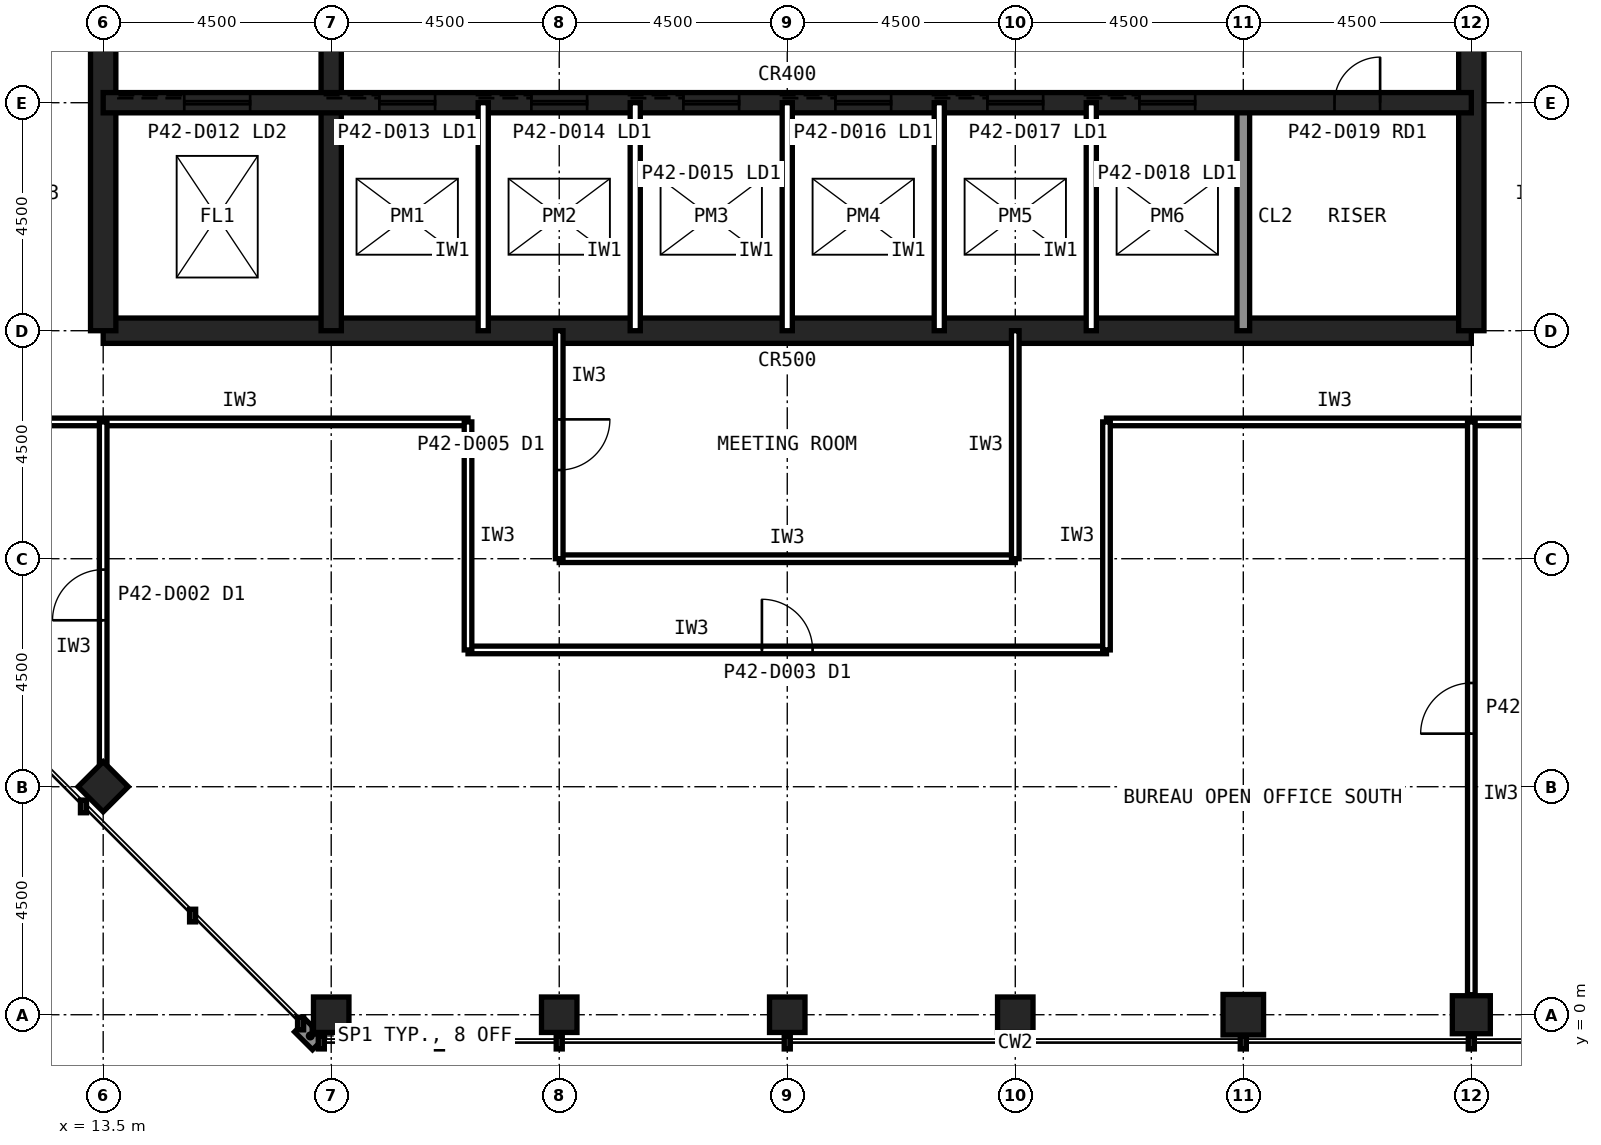
"""IFC4 building model, lengths in metres.
Left out: names, types, materials, properties, quantities, classifications, styles, units other than length and angle.
Written with IfcOpenShell. Run it as: python <this file> out.ifc"""

import sys

from ifc_helpers import new_model, si_unit, direction, frame, frame_2d, origin, origin_2d, place, context, subcontext, project, spatial, rectangle, hollow_rectangle, extrude, element, fill, save


model = new_model("IFC4")
c1 = context("Model", 3, precision=1e-05, world=origin(), true_north=direction((0.0, 1.0)))
c2 = subcontext(c1, "Body", "Model", "MODEL_VIEW")
j1 = project(units=[si_unit("LENGTHUNIT", "METRE"), si_unit("PLANEANGLEUNIT", "RADIAN")], contexts=[c1])
p1 = place(None, origin())
s1 = spatial("IfcSite", under=j1, at=p1, CompositionType="ELEMENT")
p2 = place(p1, origin())
s2 = spatial("IfcBuilding", under=s1, at=p2, CompositionType="ELEMENT")
p3 = place(p2, frame((0.0, 0.0, 175.6)))
s3 = spatial("IfcBuildingStorey", under=s2, at=p3, CompositionType="ELEMENT", Elevation=175.6)
for number, where, z_axis, x_axis in (
    (1, (18.0, 0.0, 0.0), (0.0, 0.0, 1.0), (1.0, 0.0, 0.0)),
    (2, (22.5, 0.0, 0.0), (0.0, 0.0, 1.0), (1.0, 0.0, 0.0)),
    (3, (27.0, 0.0, 0.0), (0.0, 0.0, 1.0), (1.0, 0.0, 0.0)),
    (4, (31.5, 0.0, 0.0), (0.0, 0.0, 1.0), (1.0, 0.0, 0.0)),
):
    element("IfcColumn", number, at=place(p3, frame(where, z_axis=z_axis, x_axis=x_axis)), inside=s3, PredefinedType="COLUMN", context=c2, shape_type="SweptSolid", body=[
        extrude(hollow_rectangle(XDim=0.7, YDim=0.7, WallThickness=0.036, at=origin_2d()), origin(), (0.0, 0.0, 1.0), 4.0),
    ])
p4 = place(p3, frame((36.0, 0.0, 0.0), z_axis=(0.0, 0.0, 1.0), x_axis=(1.0, 0.0, 0.0)))
e5 = element("IfcColumn", 5, at=p4, inside=s3, PredefinedType="COLUMN", context=c2, shape_type="SweptSolid", body=[
    extrude(hollow_rectangle(XDim=0.8, YDim=0.8, WallThickness=0.045, at=origin_2d()), origin(), (0.0, 0.0, 1.0), 4.0),
])
p5 = place(p3, frame((40.5, 0.0, 0.0), z_axis=(0.0, 0.0, 1.0), x_axis=(1.0, 0.0, 0.0)))
e6 = element("IfcColumn", 6, at=p5, inside=s3, PredefinedType="COLUMN", context=c2, shape_type="SweptSolid", body=[
    extrude(hollow_rectangle(XDim=0.75, YDim=0.75, WallThickness=0.04, at=origin_2d()), origin(), (0.0, 0.0, 1.0), 4.0),
])
p6 = place(p3, frame((13.5, 4.5, 0.0), z_axis=(0.0, 0.0, 1.0), x_axis=(0.707106781187, 0.707106781187, 0.0)))
e7 = element("IfcColumn", 7, at=p6, inside=s3, PredefinedType="COLUMN", context=c2, shape_type="SweptSolid", body=[
    extrude(hollow_rectangle(XDim=0.7, YDim=0.7, WallThickness=0.036, at=origin_2d()), origin(), (0.0, 0.0, 1.0), 4.0),
])
p7 = place(p3, frame((13.5, 13.5, 0.0), z_axis=(0.0, 0.0, 1.0), x_axis=(1.0, 0.0, 0.0)))
e8 = element("IfcWall", 8, at=p7, inside=s3, PredefinedType="SHEAR", context=c2, shape_type="SweptSolid", body=[
    extrude(rectangle(XDim=27.0, YDim=0.5, at=frame_2d((13.5, 0.0))), origin(), (0.0, 0.0, 1.0), 4.0),
])
p8 = place(p3, frame((40.5, 13.5, 0.0), z_axis=(0.0, 0.0, 1.0), x_axis=(0.0, 1.0, 0.0)))
e9 = element("IfcWall", 9, at=p8, inside=s3, PredefinedType="SHEAR", context=c2, shape_type="SweptSolid", body=[
    extrude(rectangle(XDim=27.0, YDim=0.5, at=frame_2d((13.5, 0.0))), origin(), (0.0, 0.0, 1.0), 4.0),
])
p9 = place(p8, frame((5.85, 0.0, 0.0)))
e10 = element("IfcOpeningElement", 10, at=p9, cuts=e9, PredefinedType="OPENING", context=c2, shape_type="SweptSolid", body=[
    extrude(rectangle(XDim=1.8, YDim=2.1, at=frame_2d((0.9, 1.05))), frame((0.0, 0.26, 0.0), z_axis=(0.0, -1.0, 0.0), x_axis=(1.0, 0.0, 0.0)), (0.0, 0.0, 1.0), 0.52),
])
p10 = place(p8, frame((19.65, 0.0, 0.0)))
e11 = element("IfcOpeningElement", 11, at=p10, cuts=e9, PredefinedType="OPENING", context=c2, shape_type="SweptSolid", body=[
    extrude(rectangle(XDim=1.2, YDim=2.1, at=frame_2d((0.6, 1.05))), frame((0.0, 0.26, 0.0), z_axis=(0.0, -1.0, 0.0), x_axis=(1.0, 0.0, 0.0)), (0.0, 0.0, 1.0), 0.52),
])
p11 = place(p3, frame((13.5, 40.5, 0.0), z_axis=(0.0, 0.0, 1.0), x_axis=(0.0, -1.0, 0.0)))
e12 = element("IfcWall", 12, at=p11, inside=s3, PredefinedType="SHEAR", context=c2, shape_type="SweptSolid", body=[
    extrude(rectangle(XDim=27.0, YDim=0.5, at=frame_2d((13.5, 0.0))), origin(), (0.0, 0.0, 1.0), 4.0),
])
p12 = place(p11, frame((19.65, 0.0, 0.0)))
e13 = element("IfcOpeningElement", 13, at=p12, cuts=e12, PredefinedType="OPENING", context=c2, shape_type="SweptSolid", body=[
    extrude(rectangle(XDim=1.2, YDim=2.1, at=frame_2d((0.6, 1.05))), frame((0.0, 0.26, 0.0), z_axis=(0.0, -1.0, 0.0), x_axis=(1.0, 0.0, 0.0)), (0.0, 0.0, 1.0), 0.52),
])
p13 = place(p11, frame((5.85, 0.0, 0.0)))
e14 = element("IfcOpeningElement", 14, at=p13, cuts=e12, PredefinedType="OPENING", context=c2, shape_type="SweptSolid", body=[
    extrude(rectangle(XDim=1.8, YDim=2.1, at=frame_2d((0.9, 1.05))), frame((0.0, 0.26, 0.0), z_axis=(0.0, -1.0, 0.0), x_axis=(1.0, 0.0, 0.0)), (0.0, 0.0, 1.0), 0.52),
])
p14 = place(p3, frame((18.0, 13.5, 0.0), z_axis=(0.0, 0.0, 1.0), x_axis=(0.0, 1.0, 0.0)))
e15 = element("IfcWall", 15, at=p14, inside=s3, PredefinedType="SHEAR", context=c2, shape_type="SweptSolid", body=[
    extrude(rectangle(XDim=18.0, YDim=0.4, at=frame_2d((9.0, 0.0))), origin(), (0.0, 0.0, 1.0), 4.0),
])
p15 = place(p3, frame((36.0, 13.5, 0.0), z_axis=(0.0, 0.0, 1.0), x_axis=(0.0, 1.0, 0.0)))
e16 = element("IfcWall", 16, at=p15, inside=s3, PredefinedType="SOLIDWALL", context=c2, shape_type="SweptSolid", body=[
    extrude(rectangle(XDim=4.5, YDim=0.25, at=frame_2d((2.25, 0.0))), origin(), (0.0, 0.0, 1.0), 3.84),
])
p16 = place(p3, frame((13.5, 18.0, 0.0), z_axis=(0.0, 0.0, 1.0), x_axis=(1.0, 0.0, 0.0)))
e17 = element("IfcWall", 17, at=p16, inside=s3, PredefinedType="SHEAR", context=c2, shape_type="SweptSolid", body=[
    extrude(rectangle(XDim=27.0, YDim=0.4, at=frame_2d((13.5, 0.0))), origin(), (0.0, 0.0, 1.0), 4.0),
])
p17 = place(p16, frame((24.3, 0.0, 0.0)))
e18 = element("IfcOpeningElement", 18, at=p17, cuts=e17, PredefinedType="OPENING", context=c2, shape_type="SweptSolid", body=[
    extrude(rectangle(XDim=0.9, YDim=2.1, at=frame_2d((0.45, 1.05))), frame((0.0, 0.21, 0.0), z_axis=(0.0, -1.0, 0.0), x_axis=(1.0, 0.0, 0.0)), (0.0, 0.0, 1.0), 0.42),
])
p18 = place(p16, frame((5.45, 0.0, 0.0)))
e19 = element("IfcOpeningElement", 19, at=p18, cuts=e17, PredefinedType="OPENING", context=c2, shape_type="SweptSolid", body=[
    extrude(rectangle(XDim=1.1, YDim=2.1, at=frame_2d((0.55, 1.05))), frame((0.0, 0.21, 0.0), z_axis=(0.0, -1.0, 0.0), x_axis=(1.0, 0.0, 0.0)), (0.0, 0.0, 1.0), 0.42),
])
p19 = place(p16, frame((8.45, 0.0, 0.0)))
e20 = element("IfcOpeningElement", 20, at=p19, cuts=e17, PredefinedType="OPENING", context=c2, shape_type="SweptSolid", body=[
    extrude(rectangle(XDim=1.1, YDim=2.1, at=frame_2d((0.55, 1.05))), frame((0.0, 0.21, 0.0), z_axis=(0.0, -1.0, 0.0), x_axis=(1.0, 0.0, 0.0)), (0.0, 0.0, 1.0), 0.42),
])
p20 = place(p16, frame((11.45, 0.0, 0.0)))
e21 = element("IfcOpeningElement", 21, at=p20, cuts=e17, PredefinedType="OPENING", context=c2, shape_type="SweptSolid", body=[
    extrude(rectangle(XDim=1.1, YDim=2.1, at=frame_2d((0.55, 1.05))), frame((0.0, 0.21, 0.0), z_axis=(0.0, -1.0, 0.0), x_axis=(1.0, 0.0, 0.0)), (0.0, 0.0, 1.0), 0.42),
])
p21 = place(p16, frame((14.45, 0.0, 0.0)))
e22 = element("IfcOpeningElement", 22, at=p21, cuts=e17, PredefinedType="OPENING", context=c2, shape_type="SweptSolid", body=[
    extrude(rectangle(XDim=1.1, YDim=2.1, at=frame_2d((0.55, 1.05))), frame((0.0, 0.21, 0.0), z_axis=(0.0, -1.0, 0.0), x_axis=(1.0, 0.0, 0.0)), (0.0, 0.0, 1.0), 0.42),
])
p22 = place(p16, frame((17.45, 0.0, 0.0)))
e23 = element("IfcOpeningElement", 23, at=p22, cuts=e17, PredefinedType="OPENING", context=c2, shape_type="SweptSolid", body=[
    extrude(rectangle(XDim=1.1, YDim=2.1, at=frame_2d((0.55, 1.05))), frame((0.0, 0.21, 0.0), z_axis=(0.0, -1.0, 0.0), x_axis=(1.0, 0.0, 0.0)), (0.0, 0.0, 1.0), 0.42),
])
p23 = place(p16, frame((20.45, 0.0, 0.0)))
e24 = element("IfcOpeningElement", 24, at=p23, cuts=e17, PredefinedType="OPENING", context=c2, shape_type="SweptSolid", body=[
    extrude(rectangle(XDim=1.1, YDim=2.1, at=frame_2d((0.55, 1.05))), frame((0.0, 0.21, 0.0), z_axis=(0.0, -1.0, 0.0), x_axis=(1.0, 0.0, 0.0)), (0.0, 0.0, 1.0), 0.42),
])
p24 = place(p16, frame((1.6, 0.0, 0.0)))
e25 = element("IfcOpeningElement", 25, at=p24, cuts=e17, PredefinedType="OPENING", context=c2, shape_type="SweptSolid", body=[
    extrude(rectangle(XDim=1.3, YDim=2.2, at=frame_2d((0.65, 1.1))), frame((0.0, 0.21, 0.0), z_axis=(0.0, -1.0, 0.0), x_axis=(1.0, 0.0, 0.0)), (0.0, 0.0, 1.0), 0.42),
])
for number, where, z_axis, x_axis in (
    (26, (21.0, 13.5, 0.0), (0.0, 0.0, 1.0), (0.0, 1.0, 0.0)),
    (27, (24.0, 13.5, 0.0), (0.0, 0.0, 1.0), (0.0, 1.0, 0.0)),
    (28, (27.0, 13.5, 0.0), (0.0, 0.0, 1.0), (0.0, 1.0, 0.0)),
    (29, (30.0, 13.5, 0.0), (0.0, 0.0, 1.0), (0.0, 1.0, 0.0)),
    (30, (33.0, 13.5, 0.0), (0.0, 0.0, 1.0), (0.0, 1.0, 0.0)),
):
    element("IfcWall", number, at=place(p3, frame(where, z_axis=z_axis, x_axis=x_axis)), inside=s3, PredefinedType="PARTITIONING", context=c2, shape_type="SweptSolid", body=[
        extrude(rectangle(XDim=4.5, YDim=0.2, at=frame_2d((2.25, 0.0))), origin(), (0.0, 0.0, 1.0), 3.84),
    ])
p25 = place(p3, frame((20.7, 7.2, 0.0), z_axis=(0.0, 0.0, 1.0), x_axis=(1.0, 0.0, 0.0)))
e31 = element("IfcWall", 31, at=p25, inside=s3, PredefinedType="PARTITIONING", context=c2, shape_type="SweptSolid", body=[
    extrude(rectangle(XDim=12.6, YDim=0.15, at=frame_2d((6.3, 0.0))), origin(), (0.0, 0.0, 1.0), 3.84),
])
p26 = place(p25, frame((5.8, 0.0, 0.0)))
e32 = element("IfcOpeningElement", 32, at=p26, cuts=e31, PredefinedType="OPENING", context=c2, shape_type="SweptSolid", body=[
    extrude(rectangle(XDim=1.0, YDim=2.1, at=frame_2d((0.5, 1.05))), frame((0.0, 0.085, 0.0), z_axis=(0.0, -1.0, 0.0), x_axis=(1.0, 0.0, 0.0)), (0.0, 0.0, 1.0), 0.17),
])
for number, where, z_axis, x_axis in (
    (33, (11.7, 11.7, 0.0), (0.0, 0.0, 1.0), (1.0, 0.0, 0.0)),
    (34, (33.3, 11.7, 0.0), (0.0, 0.0, 1.0), (1.0, 0.0, 0.0)),
):
    element("IfcWall", number, at=place(p3, frame(where, z_axis=z_axis, x_axis=x_axis)), inside=s3, PredefinedType="PARTITIONING", context=c2, shape_type="SweptSolid", body=[
        extrude(rectangle(XDim=9.0, YDim=0.15, at=frame_2d((4.5, 0.0))), origin(), (0.0, 0.0, 1.0), 3.84),
    ])
for number, where, z_axis, x_axis in (
    (35, (20.7, 11.7, 0.0), (0.0, 0.0, 1.0), (0.0, -1.0, 0.0)),
    (36, (33.3, 7.2, 0.0), (0.0, 0.0, 1.0), (0.0, 1.0, 0.0)),
):
    element("IfcWall", number, at=place(p3, frame(where, z_axis=z_axis, x_axis=x_axis)), inside=s3, PredefinedType="PARTITIONING", context=c2, shape_type="SweptSolid", body=[
        extrude(rectangle(XDim=4.5, YDim=0.15, at=frame_2d((2.25, 0.0))), origin(), (0.0, 0.0, 1.0), 3.84),
    ])
p27 = place(p3, frame((22.5, 9.0, 0.0), z_axis=(0.0, 0.0, 1.0), x_axis=(1.0, 0.0, 0.0)))
e37 = element("IfcWall", 37, at=p27, inside=s3, PredefinedType="PARTITIONING", context=c2, shape_type="SweptSolid", body=[
    extrude(rectangle(XDim=9.0, YDim=0.15, at=frame_2d((4.5, 0.0))), origin(), (0.0, 0.0, 1.0), 3.84),
])
p28 = place(p3, frame((31.5, 9.0, 0.0), z_axis=(0.0, 0.0, 1.0), x_axis=(0.0, 1.0, 0.0)))
e38 = element("IfcWall", 38, at=p28, inside=s3, PredefinedType="PARTITIONING", context=c2, shape_type="SweptSolid", body=[
    extrude(rectangle(XDim=4.5, YDim=0.15, at=frame_2d((2.25, 0.0))), origin(), (0.0, 0.0, 1.0), 2.989),
])
p29 = place(p3, frame((22.5, 13.5, 0.0), z_axis=(0.0, 0.0, 1.0), x_axis=(0.0, -1.0, 0.0)))
e39 = element("IfcWall", 39, at=p29, inside=s3, PredefinedType="PARTITIONING", context=c2, shape_type="SweptSolid", body=[
    extrude(rectangle(XDim=4.5, YDim=0.15, at=frame_2d((2.25, 0.0))), origin(), (0.0, 0.0, 1.0), 2.989),
])
p30 = place(p29, frame((1.75, 0.0, 0.0)))
e40 = element("IfcOpeningElement", 40, at=p30, cuts=e39, PredefinedType="OPENING", context=c2, shape_type="SweptSolid", body=[
    extrude(rectangle(XDim=1.0, YDim=2.1, at=frame_2d((0.5, 1.05))), frame((0.0, 0.085, 0.0), z_axis=(0.0, -1.0, 0.0), x_axis=(1.0, 0.0, 0.0)), (0.0, 0.0, 1.0), 0.17),
])
p31 = place(p3, frame((40.5, 0.395, 0.0), z_axis=(0.0, 0.0, 1.0), x_axis=(0.0, 1.0, 0.0)))
e41 = element("IfcWall", 41, at=p31, inside=s3, PredefinedType="PARTITIONING", context=c2, shape_type="SweptSolid", body=[
    extrude(rectangle(XDim=11.305, YDim=0.15, at=frame_2d((5.652, 0.0))), origin(), (0.0, 0.0, 1.0), 2.989),
])
p32 = place(p31, frame((5.153, 0.0, 0.0)))
e42 = element("IfcOpeningElement", 42, at=p32, cuts=e41, PredefinedType="OPENING", context=c2, shape_type="SweptSolid", body=[
    extrude(rectangle(XDim=1.0, YDim=2.1, at=frame_2d((0.5, 1.05))), frame((0.0, 0.085, 0.0), z_axis=(0.0, -1.0, 0.0), x_axis=(1.0, 0.0, 0.0)), (0.0, 0.0, 1.0), 0.17),
])
p33 = place(p3, frame((13.5, 4.87, 0.0), z_axis=(0.0, 0.0, 1.0), x_axis=(0.0, 1.0, 0.0)))
e43 = element("IfcWall", 43, at=p33, inside=s3, PredefinedType="PARTITIONING", context=c2, shape_type="SweptSolid", body=[
    extrude(rectangle(XDim=6.83, YDim=0.15, at=frame_2d((3.415, 0.0))), origin(), (0.0, 0.0, 1.0), 2.989),
])
p34 = place(p33, frame((2.915, 0.0, 0.0)))
e44 = element("IfcOpeningElement", 44, at=p34, cuts=e43, PredefinedType="OPENING", context=c2, shape_type="SweptSolid", body=[
    extrude(rectangle(XDim=1.0, YDim=2.1, at=frame_2d((0.5, 1.05))), frame((0.0, 0.085, 0.0), z_axis=(0.0, -1.0, 0.0), x_axis=(1.0, 0.0, 0.0)), (0.0, 0.0, 1.0), 0.17),
])
p35 = place(p17, origin())
e45 = element("IfcDoor", 45, at=p35, inside=s3, OperationType="SINGLE_SWING_RIGHT", PredefinedType="DOOR", context=c2, shape_type="SweptSolid", body=[
    extrude(rectangle(XDim=0.9, YDim=2.1, at=frame_2d((0.45, 1.05))), frame((0.0, 0.025, 0.0), z_axis=(0.0, -1.0, 0.0), x_axis=(1.0, 0.0, 0.0)), (0.0, 0.0, 1.0), 0.05),
])
fill(e18, e45)
p36 = place(p18, origin())
e46 = element("IfcDoor", 46, at=p36, inside=s3, OperationType="SLIDING_TO_LEFT", PredefinedType="DOOR", context=c2, shape_type="SweptSolid", body=[
    extrude(rectangle(XDim=1.1, YDim=2.1, at=frame_2d((0.55, 1.05))), frame((0.0, 0.025, 0.0), z_axis=(0.0, -1.0, 0.0), x_axis=(1.0, 0.0, 0.0)), (0.0, 0.0, 1.0), 0.05),
])
fill(e19, e46)
p37 = place(p19, origin())
e47 = element("IfcDoor", 47, at=p37, inside=s3, OperationType="SLIDING_TO_LEFT", PredefinedType="DOOR", context=c2, shape_type="SweptSolid", body=[
    extrude(rectangle(XDim=1.1, YDim=2.1, at=frame_2d((0.55, 1.05))), frame((0.0, 0.025, 0.0), z_axis=(0.0, -1.0, 0.0), x_axis=(1.0, 0.0, 0.0)), (0.0, 0.0, 1.0), 0.05),
])
fill(e20, e47)
p38 = place(p20, origin())
e48 = element("IfcDoor", 48, at=p38, inside=s3, OperationType="SLIDING_TO_LEFT", PredefinedType="DOOR", context=c2, shape_type="SweptSolid", body=[
    extrude(rectangle(XDim=1.1, YDim=2.1, at=frame_2d((0.55, 1.05))), frame((0.0, 0.025, 0.0), z_axis=(0.0, -1.0, 0.0), x_axis=(1.0, 0.0, 0.0)), (0.0, 0.0, 1.0), 0.05),
])
fill(e21, e48)
p39 = place(p21, origin())
e49 = element("IfcDoor", 49, at=p39, inside=s3, OperationType="SLIDING_TO_LEFT", PredefinedType="DOOR", context=c2, shape_type="SweptSolid", body=[
    extrude(rectangle(XDim=1.1, YDim=2.1, at=frame_2d((0.55, 1.05))), frame((0.0, 0.025, 0.0), z_axis=(0.0, -1.0, 0.0), x_axis=(1.0, 0.0, 0.0)), (0.0, 0.0, 1.0), 0.05),
])
fill(e22, e49)
p40 = place(p22, origin())
e50 = element("IfcDoor", 50, at=p40, inside=s3, OperationType="SLIDING_TO_LEFT", PredefinedType="DOOR", context=c2, shape_type="SweptSolid", body=[
    extrude(rectangle(XDim=1.1, YDim=2.1, at=frame_2d((0.55, 1.05))), frame((0.0, 0.025, 0.0), z_axis=(0.0, -1.0, 0.0), x_axis=(1.0, 0.0, 0.0)), (0.0, 0.0, 1.0), 0.05),
])
fill(e23, e50)
p41 = place(p23, origin())
e51 = element("IfcDoor", 51, at=p41, inside=s3, OperationType="SLIDING_TO_LEFT", PredefinedType="DOOR", context=c2, shape_type="SweptSolid", body=[
    extrude(rectangle(XDim=1.1, YDim=2.1, at=frame_2d((0.55, 1.05))), frame((0.0, 0.025, 0.0), z_axis=(0.0, -1.0, 0.0), x_axis=(1.0, 0.0, 0.0)), (0.0, 0.0, 1.0), 0.05),
])
fill(e24, e51)
p42 = place(p24, origin())
e52 = element("IfcDoor", 52, at=p42, inside=s3, OperationType="SLIDING_TO_LEFT", PredefinedType="DOOR", context=c2, shape_type="SweptSolid", body=[
    extrude(rectangle(XDim=1.3, YDim=2.2, at=frame_2d((0.65, 1.1))), frame((0.0, 0.025, 0.0), z_axis=(0.0, -1.0, 0.0), x_axis=(1.0, 0.0, 0.0)), (0.0, 0.0, 1.0), 0.05),
])
fill(e25, e52)
p43 = place(p26, origin())
e53 = element("IfcDoor", 53, at=p43, inside=s3, OperationType="SINGLE_SWING_LEFT", PredefinedType="DOOR", context=c2, shape_type="SweptSolid", body=[
    extrude(rectangle(XDim=1.0, YDim=2.1, at=frame_2d((0.5, 1.05))), frame((0.0, 0.025, 0.0), z_axis=(0.0, -1.0, 0.0), x_axis=(1.0, 0.0, 0.0)), (0.0, 0.0, 1.0), 0.05),
])
fill(e32, e53)
p44 = place(p30, origin())
e54 = element("IfcDoor", 54, at=p44, inside=s3, OperationType="SINGLE_SWING_LEFT", PredefinedType="DOOR", context=c2, shape_type="SweptSolid", body=[
    extrude(rectangle(XDim=1.0, YDim=2.1, at=frame_2d((0.5, 1.05))), frame((0.0, 0.025, 0.0), z_axis=(0.0, -1.0, 0.0), x_axis=(1.0, 0.0, 0.0)), (0.0, 0.0, 1.0), 0.05),
])
fill(e40, e54)
p45 = place(p32, origin())
e55 = element("IfcDoor", 55, at=p45, inside=s3, OperationType="SINGLE_SWING_LEFT", PredefinedType="DOOR", context=c2, shape_type="SweptSolid", body=[
    extrude(rectangle(XDim=1.0, YDim=2.1, at=frame_2d((0.5, 1.05))), frame((0.0, 0.025, 0.0), z_axis=(0.0, -1.0, 0.0), x_axis=(1.0, 0.0, 0.0)), (0.0, 0.0, 1.0), 0.05),
])
fill(e42, e55)
p46 = place(p34, origin())
e56 = element("IfcDoor", 56, at=p46, inside=s3, OperationType="SINGLE_SWING_LEFT", PredefinedType="DOOR", context=c2, shape_type="SweptSolid", body=[
    extrude(rectangle(XDim=1.0, YDim=2.1, at=frame_2d((0.5, 1.05))), frame((0.0, 0.025, 0.0), z_axis=(0.0, -1.0, 0.0), x_axis=(1.0, 0.0, 0.0)), (0.0, 0.0, 1.0), 0.05),
])
fill(e44, e56)
save(model, sys.argv[1])
